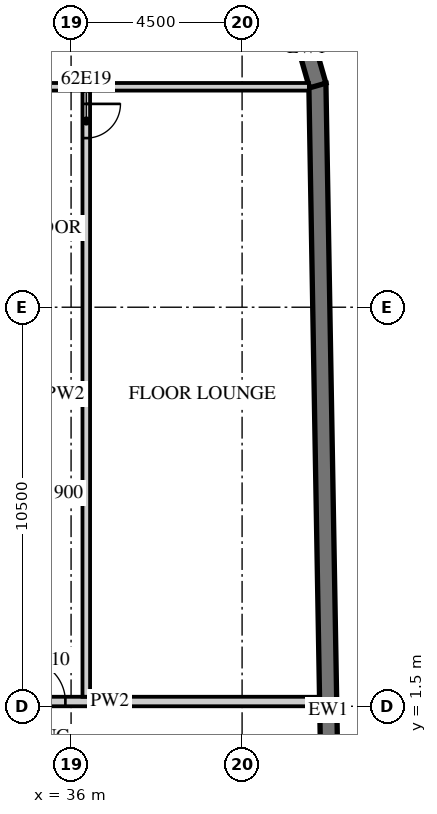
"""IFC4 building model, lengths in metres.
Left out: names, types, materials, properties, quantities, classifications, styles, units other than length and angle.
Written with IfcOpenShell. Run it as: python <this file> out.ifc"""

import sys

from ifc_helpers import new_model, si_unit, direction, frame, frame_2d, origin, place, context, subcontext, project, spatial, polyline, rectangle, outline, extrude, element, fill, save


model = new_model("IFC4")
c1 = context("Model", 3, precision=1e-05, world=origin(), true_north=direction((0.0, 1.0)))
c2 = subcontext(c1, "Body", "Model", "MODEL_VIEW")
j1 = project(units=[si_unit("LENGTHUNIT", "METRE"), si_unit("PLANEANGLEUNIT", "RADIAN")], contexts=[c1])
p1 = place(None, origin())
s1 = spatial("IfcSite", under=j1, at=p1, CompositionType="ELEMENT")
p2 = place(p1, origin())
s2 = spatial("IfcBuilding", under=s1, at=p2, CompositionType="ELEMENT")
p3 = place(p2, frame((0.0, 0.0, 250.7)))
s3 = spatial("IfcBuildingStorey", under=s2, at=p3, CompositionType="ELEMENT", Elevation=250.7)
p4 = place(p3, frame((43.057, -15.103, 0.0), z_axis=(0.0, 0.0, 1.0), x_axis=(-0.017452408953, 0.999847695112, 0.0)))
e1 = element("IfcWall", 1, at=p4, inside=s3, PredefinedType="SOLIDWALL", context=c2, shape_type="SweptSolid", body=[
    extrude(rectangle(XDim=33.0, YDim=0.45, at=frame_2d((16.5, 0.0))), origin(), (0.0, 0.0, 1.0), 3.02),
])
p5 = place(p3, frame((42.49, 17.833, 0.0), z_axis=(0.0, 0.0, 1.0), x_axis=(-0.275546368831, 0.961287781377, 0.0)))
e2 = element("IfcWall", 2, at=p5, inside=s3, PredefinedType="SOLIDWALL", context=c2, shape_type="SweptSolid", body=[
    extrude(outline(polyline([(0.0, -0.225), (2.071, -0.225), (1.95, 0.225), (0.121, 0.225), (0.0, -0.225)])), origin(), (0.0, 0.0, 1.0), 3.02),
])
p6 = place(p3, frame((31.5, 1.625, 0.0), z_axis=(0.0, 0.0, 1.0), x_axis=(1.0, 0.0, 0.0)))
e3 = element("IfcWall", 3, at=p6, inside=s3, PredefinedType="PARTITIONING", context=c2, shape_type="SweptSolid", body=[
    extrude(rectangle(XDim=11.04, YDim=0.25, at=frame_2d((5.52, 0.0))), origin(), (0.0, 0.0, 1.0), 3.02),
])
p7 = place(p6, frame((0.625, 0.0, 0.0)))
e4 = element("IfcOpeningElement", 4, at=p7, cuts=e3, PredefinedType="OPENING", context=c2, shape_type="SweptSolid", body=[
    extrude(rectangle(XDim=1.3, YDim=2.1, at=frame_2d((0.65, 1.05))), frame((0.0, 0.135, 0.0), z_axis=(0.0, -1.0, 0.0), x_axis=(1.0, 0.0, 0.0)), (0.0, 0.0, 1.0), 0.27),
])
p8 = place(p6, frame((3.25, 0.0, 0.0)))
e5 = element("IfcOpeningElement", 5, at=p8, cuts=e3, PredefinedType="OPENING", context=c2, shape_type="SweptSolid", body=[
    extrude(rectangle(XDim=1.1, YDim=2.1, at=frame_2d((0.55, 1.05))), frame((0.0, 0.135, 0.0), z_axis=(0.0, -1.0, 0.0), x_axis=(1.0, 0.0, 0.0)), (0.0, 0.0, 1.0), 0.27),
])
p9 = place(p3, frame((36.4, 1.75, 0.0), z_axis=(0.0, 0.0, 1.0), x_axis=(0.0, 1.0, 0.0)))
e6 = element("IfcWall", 6, at=p9, inside=s3, PredefinedType="PARTITIONING", context=c2, shape_type="SweptSolid", body=[
    extrude(rectangle(XDim=15.95, YDim=0.2, at=frame_2d((7.975, 0.0))), origin(), (0.0, 0.0, 1.0), 3.02),
])
p10 = place(p9, frame((14.7, 0.0, 0.0)))
e7 = element("IfcOpeningElement", 7, at=p10, cuts=e6, PredefinedType="OPENING", context=c2, shape_type="SweptSolid", body=[
    extrude(rectangle(XDim=0.9, YDim=2.1, at=frame_2d((0.45, 1.05))), frame((0.0, 0.11, 0.0), z_axis=(0.0, -1.0, 0.0), x_axis=(1.0, 0.0, 0.0)), (0.0, 0.0, 1.0), 0.22),
])
p11 = place(p3, frame((13.6, 17.8, 0.0), z_axis=(0.0, 0.0, 1.0), x_axis=(1.0, 0.0, 0.0)))
e8 = element("IfcWall", 8, at=p11, inside=s3, PredefinedType="PARTITIONING", context=c2, shape_type="SweptSolid", body=[
    extrude(rectangle(XDim=28.657, YDim=0.2, at=frame_2d((14.329, 0.0))), origin(), (0.0, 0.0, 1.0), 3.02),
])
p12 = place(p11, frame((15.012, 0.0, 0.0)))
e9 = element("IfcOpeningElement", 9, at=p12, cuts=e8, PredefinedType="OPENING", context=c2, shape_type="SweptSolid", body=[
    extrude(rectangle(XDim=0.9, YDim=2.1, at=frame_2d((0.45, 1.05))), frame((0.0, 0.11, 0.0), z_axis=(0.0, -1.0, 0.0), x_axis=(1.0, 0.0, 0.0)), (0.0, 0.0, 1.0), 0.22),
])
p13 = place(p11, frame((6.712, 0.0, 0.0)))
e10 = element("IfcOpeningElement", 10, at=p13, cuts=e8, PredefinedType="OPENING", context=c2, shape_type="SweptSolid", body=[
    extrude(rectangle(XDim=0.9, YDim=2.1, at=frame_2d((0.45, 1.05))), frame((0.0, 0.11, 0.0), z_axis=(0.0, -1.0, 0.0), x_axis=(1.0, 0.0, 0.0)), (0.0, 0.0, 1.0), 0.22),
])
p14 = place(p8, origin())
e11 = element("IfcDoor", 11, at=p14, inside=s3, OperationType="SINGLE_SWING_LEFT", PredefinedType="DOOR", context=c2, shape_type="SweptSolid", body=[
    extrude(rectangle(XDim=1.1, YDim=2.1, at=frame_2d((0.55, 1.05))), frame((0.0, 0.025, 0.0), z_axis=(0.0, -1.0, 0.0), x_axis=(1.0, 0.0, 0.0)), (0.0, 0.0, 1.0), 0.05),
])
fill(e5, e11)
p15 = place(p10, origin())
e12 = element("IfcDoor", 12, at=p15, inside=s3, OperationType="SINGLE_SWING_RIGHT", PredefinedType="DOOR", context=c2, shape_type="SweptSolid", body=[
    extrude(rectangle(XDim=0.9, YDim=2.1, at=frame_2d((0.45, 1.05))), frame((0.0, 0.025, 0.0), z_axis=(0.0, -1.0, 0.0), x_axis=(1.0, 0.0, 0.0)), (0.0, 0.0, 1.0), 0.05),
])
fill(e7, e12)
save(model, sys.argv[1])
